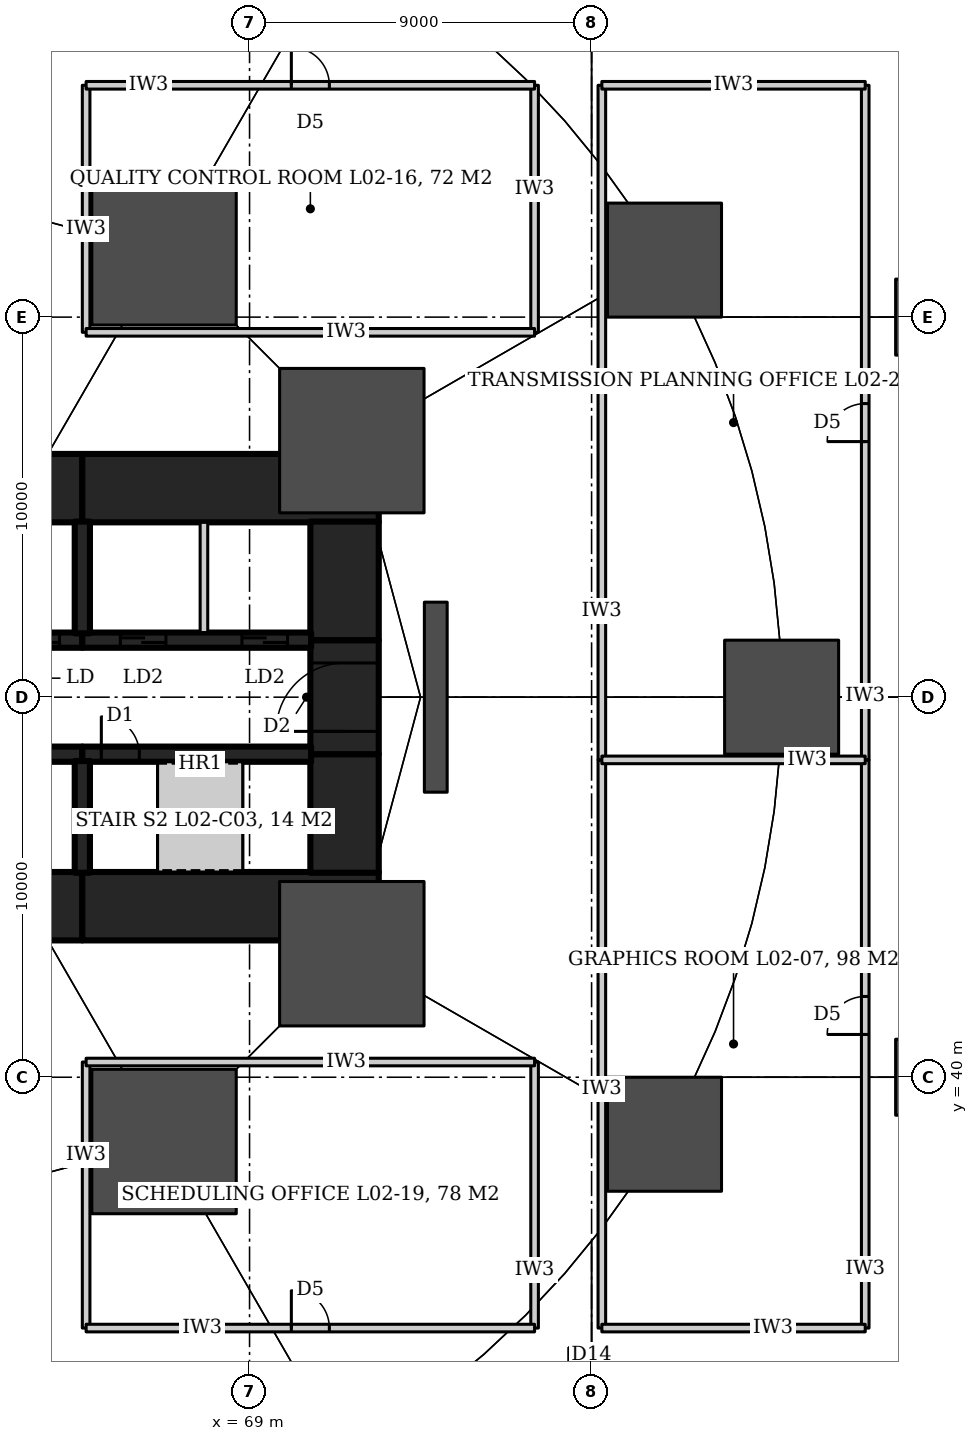
"""IFC4 building model, lengths in metres.
Left out: names, types, materials, properties, quantities, classifications, styles, units other than length and angle.
Written with IfcOpenShell. Run it as: python <this file> out.ifc"""

import sys

from ifc_helpers import new_model, si_unit, direction, frame, frame_2d, origin, origin_2d, place, context, subcontext, project, spatial, rectangle, circle, extrude, element, fill, save


model = new_model("IFC4")
c1 = context("Model", 3, precision=1e-05, world=origin(), true_north=direction((0.0, 1.0)))
c2 = subcontext(c1, "Body", "Model", "MODEL_VIEW")
j1 = project(units=[si_unit("LENGTHUNIT", "METRE"), si_unit("PLANEANGLEUNIT", "RADIAN")], contexts=[c1])
p1 = place(None, origin())
s1 = spatial("IfcSite", under=j1, at=p1, CompositionType="ELEMENT")
p2 = place(p1, origin())
s2 = spatial("IfcBuilding", under=s1, at=p2, CompositionType="ELEMENT")
p3 = place(p2, frame((0.0, 0.0, 15.0)))
s3 = spatial("IfcBuildingStorey", under=s2, at=p3, CompositionType="ELEMENT", Elevation=15.0)
for number, where, z_axis, x_axis in (
    (1, (87.0, 40.0, 0.0), (0.0, 0.0, 1.0), (1.0, 0.0, 0.0)),
    (2, (87.0, 60.0, 0.0), (0.0, 0.0, 1.0), (1.0, 0.0, 0.0)),
):
    element("IfcColumn", number, at=place(p3, frame(where, z_axis=z_axis, x_axis=x_axis)), inside=s3, PredefinedType="COLUMN", context=c2, shape_type="SweptSolid", body=[
        extrude(rectangle(XDim=2.0, YDim=2.0, at=origin_2d()), origin(), (0.0, 0.0, 1.0), 5.0),
    ])
for number, where, z_axis, x_axis in (
    (3, (83.0, 50.0, 0.0), (0.0, 0.0, 1.0), (1.0, 0.0, 0.0)),
    (4, (79.919, 61.5, 0.0), (0.0, 0.0, 1.0), (1.0, 0.0, 0.0)),
    (5, (79.919, 38.5, 0.0), (0.0, 0.0, 1.0), (1.0, 0.0, 0.0)),
):
    element("IfcColumn", number, at=place(p3, frame(where, z_axis=z_axis, x_axis=x_axis)), inside=s3, PredefinedType="COLUMN", context=c2, shape_type="SweptSolid", body=[
        extrude(circle(Radius=1.5, at=origin_2d()), origin(), (0.0, 0.0, 1.0), 5.0),
    ])
p4 = place(p3, frame((73.9, 50.0, 0.0), z_axis=(0.0, 0.0, 1.0), x_axis=(1.0, 0.0, 0.0)))
e6 = element("IfcColumn", 6, at=p4, inside=s3, PredefinedType="COLUMN", context=c2, shape_type="SweptSolid", body=[
    extrude(rectangle(XDim=0.6, YDim=5.0, at=origin_2d()), origin(), (0.0, 0.0, 1.0), 5.0),
])
for number, where, z_axis, x_axis in (
    (7, (71.691, 56.75, 0.0), (0.0, 0.0, 1.0), (1.0, 0.0, 0.0)),
    (8, (66.75, 61.691, 0.0), (0.0, 0.0, 1.0), (1.0, 0.0, 0.0)),
    (9, (66.75, 38.309, 0.0), (0.0, 0.0, 1.0), (1.0, 0.0, 0.0)),
    (10, (71.691, 43.25, 0.0), (0.0, 0.0, 1.0), (1.0, 0.0, 0.0)),
):
    element("IfcColumn", number, at=place(p3, frame(where, z_axis=z_axis, x_axis=x_axis)), inside=s3, PredefinedType="COLUMN", context=c2, shape_type="SweptSolid", body=[
        extrude(circle(Radius=1.9, at=origin_2d()), origin(), (0.0, 0.0, 1.0), 5.0),
    ])
p5 = place(p3, frame((55.4, 55.5, 0.0), z_axis=(0.0, 0.0, 1.0), x_axis=(1.0, 0.0, 0.0)))
e11 = element("IfcWall", 11, at=p5, inside=s3, PredefinedType="SHEAR", context=c2, shape_type="SweptSolid", body=[
    extrude(rectangle(XDim=9.2, YDim=1.8, at=frame_2d((4.6, 0.0))), origin(), (0.0, 0.0, 1.0), 5.0),
])
p6 = place(p3, frame((64.6, 55.5, 0.0), z_axis=(0.0, 0.0, 1.0), x_axis=(1.0, 0.0, 0.0)))
e12 = element("IfcWall", 12, at=p6, inside=s3, PredefinedType="SHEAR", context=c2, shape_type="SweptSolid", body=[
    extrude(rectangle(XDim=7.8, YDim=1.8, at=frame_2d((3.9, 0.0))), origin(), (0.0, 0.0, 1.0), 5.0),
])
p7 = place(p3, frame((55.4, 44.5, 0.0), z_axis=(0.0, 0.0, 1.0), x_axis=(1.0, 0.0, 0.0)))
e13 = element("IfcWall", 13, at=p7, inside=s3, PredefinedType="SHEAR", context=c2, shape_type="SweptSolid", body=[
    extrude(rectangle(XDim=9.2, YDim=1.8, at=frame_2d((4.6, 0.0))), origin(), (0.0, 0.0, 1.0), 5.0),
])
p8 = place(p3, frame((64.6, 44.5, 0.0), z_axis=(0.0, 0.0, 1.0), x_axis=(1.0, 0.0, 0.0)))
e14 = element("IfcWall", 14, at=p8, inside=s3, PredefinedType="SHEAR", context=c2, shape_type="SweptSolid", body=[
    extrude(rectangle(XDim=7.8, YDim=1.8, at=frame_2d((3.9, 0.0))), origin(), (0.0, 0.0, 1.0), 5.0),
])
p9 = place(p3, frame((71.5, 45.38, 0.0), z_axis=(0.0, 0.0, 1.0), x_axis=(0.0, 1.0, 0.0)))
e15 = element("IfcWall", 15, at=p9, inside=s3, PredefinedType="SHEAR", context=c2, shape_type="SweptSolid", body=[
    extrude(rectangle(XDim=3.12, YDim=1.8, at=frame_2d((1.56, 0.0))), origin(), (0.0, 0.0, 1.0), 5.0),
])
p10 = place(p3, frame((71.5, 48.5, 0.0), z_axis=(0.0, 0.0, 1.0), x_axis=(0.0, 1.0, 0.0)))
e16 = element("IfcWall", 16, at=p10, inside=s3, PredefinedType="SHEAR", context=c2, shape_type="SweptSolid", body=[
    extrude(rectangle(XDim=3.0, YDim=1.8, at=frame_2d((1.5, 0.0))), origin(), (0.0, 0.0, 1.0), 5.0),
])
p11 = place(p10, frame((0.6, 0.0, 0.0)))
e17 = element("IfcOpeningElement", 17, at=p11, cuts=e16, PredefinedType="OPENING", context=c2, shape_type="SweptSolid", body=[
    extrude(rectangle(XDim=1.8, YDim=2.1, at=frame_2d((0.9, 1.05))), frame((0.0, 0.91, 0.0), z_axis=(0.0, -1.0, 0.0), x_axis=(1.0, 0.0, 0.0)), (0.0, 0.0, 1.0), 1.82),
])
p12 = place(p3, frame((71.5, 51.5, 0.0), z_axis=(0.0, 0.0, 1.0), x_axis=(0.0, 1.0, 0.0)))
e18 = element("IfcWall", 18, at=p12, inside=s3, PredefinedType="SHEAR", context=c2, shape_type="SweptSolid", body=[
    extrude(rectangle(XDim=3.12, YDim=1.8, at=frame_2d((1.56, 0.0))), origin(), (0.0, 0.0, 1.0), 5.0),
])
p13 = place(p3, frame((55.4, 51.5, 0.0), z_axis=(0.0, 0.0, 1.0), x_axis=(1.0, 0.0, 0.0)))
e19 = element("IfcWall", 19, at=p13, inside=s3, PredefinedType="SHEAR", context=c2, shape_type="SweptSolid", body=[
    extrude(rectangle(XDim=9.2, YDim=0.4, at=frame_2d((4.6, 0.0))), origin(), (0.0, 0.0, 1.0), 5.0),
])
p14 = place(p13, frame((0.6, 0.0, 0.0)))
e20 = element("IfcOpeningElement", 20, at=p14, cuts=e19, PredefinedType="OPENING", context=c2, shape_type="SweptSolid", body=[
    extrude(rectangle(XDim=1.1, YDim=2.1, at=frame_2d((0.55, 1.05))), frame((0.0, 0.21, 0.0), z_axis=(0.0, -1.0, 0.0), x_axis=(1.0, 0.0, 0.0)), (0.0, 0.0, 1.0), 0.42),
])
p15 = place(p13, frame((2.9, 0.0, 0.0)))
e21 = element("IfcOpeningElement", 21, at=p15, cuts=e19, PredefinedType="OPENING", context=c2, shape_type="SweptSolid", body=[
    extrude(rectangle(XDim=1.1, YDim=2.1, at=frame_2d((0.55, 1.05))), frame((0.0, 0.21, 0.0), z_axis=(0.0, -1.0, 0.0), x_axis=(1.0, 0.0, 0.0)), (0.0, 0.0, 1.0), 0.42),
])
p16 = place(p13, frame((5.2, 0.0, 0.0)))
e22 = element("IfcOpeningElement", 22, at=p16, cuts=e19, PredefinedType="OPENING", context=c2, shape_type="SweptSolid", body=[
    extrude(rectangle(XDim=1.1, YDim=2.1, at=frame_2d((0.55, 1.05))), frame((0.0, 0.21, 0.0), z_axis=(0.0, -1.0, 0.0), x_axis=(1.0, 0.0, 0.0)), (0.0, 0.0, 1.0), 0.42),
])
p17 = place(p13, frame((7.5, 0.0, 0.0)))
e23 = element("IfcOpeningElement", 23, at=p17, cuts=e19, PredefinedType="OPENING", context=c2, shape_type="SweptSolid", body=[
    extrude(rectangle(XDim=1.1, YDim=2.1, at=frame_2d((0.55, 1.05))), frame((0.0, 0.21, 0.0), z_axis=(0.0, -1.0, 0.0), x_axis=(1.0, 0.0, 0.0)), (0.0, 0.0, 1.0), 0.42),
])
p18 = place(p3, frame((64.6, 51.5, 0.0), z_axis=(0.0, 0.0, 1.0), x_axis=(1.0, 0.0, 0.0)))
e24 = element("IfcWall", 24, at=p18, inside=s3, PredefinedType="SHEAR", context=c2, shape_type="SweptSolid", body=[
    extrude(rectangle(XDim=6.02, YDim=0.4, at=frame_2d((3.01, 0.0))), origin(), (0.0, 0.0, 1.0), 5.0),
])
p19 = place(p18, frame((1.0, 0.0, 0.0)))
e25 = element("IfcOpeningElement", 25, at=p19, cuts=e24, PredefinedType="OPENING", context=c2, shape_type="SweptSolid", body=[
    extrude(rectangle(XDim=1.2, YDim=2.1, at=frame_2d((0.6, 1.05))), frame((0.0, 0.21, 0.0), z_axis=(0.0, -1.0, 0.0), x_axis=(1.0, 0.0, 0.0)), (0.0, 0.0, 1.0), 0.42),
])
p20 = place(p18, frame((4.2, 0.0, 0.0)))
e26 = element("IfcOpeningElement", 26, at=p20, cuts=e24, PredefinedType="OPENING", context=c2, shape_type="SweptSolid", body=[
    extrude(rectangle(XDim=1.2, YDim=2.1, at=frame_2d((0.6, 1.05))), frame((0.0, 0.21, 0.0), z_axis=(0.0, -1.0, 0.0), x_axis=(1.0, 0.0, 0.0)), (0.0, 0.0, 1.0), 0.42),
])
p21 = place(p3, frame((55.4, 48.5, 0.0), z_axis=(0.0, 0.0, 1.0), x_axis=(1.0, 0.0, 0.0)))
e27 = element("IfcWall", 27, at=p21, inside=s3, PredefinedType="SHEAR", context=c2, shape_type="SweptSolid", body=[
    extrude(rectangle(XDim=9.2, YDim=0.4, at=frame_2d((4.6, 0.0))), origin(), (0.0, 0.0, 1.0), 5.0),
])
p22 = place(p3, frame((64.6, 48.5, 0.0), z_axis=(0.0, 0.0, 1.0), x_axis=(1.0, 0.0, 0.0)))
e28 = element("IfcWall", 28, at=p22, inside=s3, PredefinedType="SHEAR", context=c2, shape_type="SweptSolid", body=[
    extrude(rectangle(XDim=6.02, YDim=0.4, at=frame_2d((3.01, 0.0))), origin(), (0.0, 0.0, 1.0), 5.0),
])
p23 = place(p22, frame((0.5, 0.0, 0.0)))
e29 = element("IfcOpeningElement", 29, at=p23, cuts=e28, PredefinedType="OPENING", context=c2, shape_type="SweptSolid", body=[
    extrude(rectangle(XDim=1.0, YDim=2.1, at=frame_2d((0.5, 1.05))), frame((0.0, 0.21, 0.0), z_axis=(0.0, -1.0, 0.0), x_axis=(1.0, 0.0, 0.0)), (0.0, 0.0, 1.0), 0.42),
])
for number, where, z_axis, x_axis in (
    (30, (64.6, 51.68, 0.0), (0.0, 0.0, 1.0), (0.0, 1.0, 0.0)),
    (31, (64.6, 48.32, 0.0), (0.0, 0.0, 1.0), (0.0, -1.0, 0.0)),
):
    element("IfcWall", number, at=place(p3, frame(where, z_axis=z_axis, x_axis=x_axis)), inside=s3, PredefinedType="SHEAR", context=c2, shape_type="SweptSolid", body=[
        extrude(rectangle(XDim=2.94, YDim=0.4, at=frame_2d((1.47, 0.0))), origin(), (0.0, 0.0, 1.0), 5.0),
    ])
p24 = place(p3, frame((64.7, 33.4, 0.0), z_axis=(0.0, 0.0, 1.0), x_axis=(0.0, 1.0, 0.0)))
e32 = element("IfcWall", 32, at=p24, inside=s3, PredefinedType="PARTITIONING", context=c2, shape_type="SweptSolid", body=[
    extrude(rectangle(XDim=7.0, YDim=0.2, at=frame_2d((3.5, 0.0))), origin(), (0.0, 0.0, 1.0), 1.48),
])
p25 = place(p3, frame((64.7, 59.6, 0.0), z_axis=(0.0, 0.0, 1.0), x_axis=(0.0, 1.0, 0.0)))
e33 = element("IfcWall", 33, at=p25, inside=s3, PredefinedType="PARTITIONING", context=c2, shape_type="SweptSolid", body=[
    extrude(rectangle(XDim=6.5, YDim=0.2, at=frame_2d((3.25, 0.0))), origin(), (0.0, 0.0, 1.0), 1.48),
])
p26 = place(p3, frame((76.5, 33.4, 0.0), z_axis=(0.0, 0.0, 1.0), x_axis=(0.0, 1.0, 0.0)))
e34 = element("IfcWall", 34, at=p26, inside=s3, PredefinedType="PARTITIONING", context=c2, shape_type="SweptSolid", body=[
    extrude(rectangle(XDim=7.0, YDim=0.2, at=frame_2d((3.5, 0.0))), origin(), (0.0, 0.0, 1.0), 2.08),
])
p27 = place(p3, frame((76.5, 59.6, 0.0), z_axis=(0.0, 0.0, 1.0), x_axis=(0.0, 1.0, 0.0)))
e35 = element("IfcWall", 35, at=p27, inside=s3, PredefinedType="PARTITIONING", context=c2, shape_type="SweptSolid", body=[
    extrude(rectangle(XDim=6.5, YDim=0.2, at=frame_2d((3.25, 0.0))), origin(), (0.0, 0.0, 1.0), 2.08),
])
p28 = place(p3, frame((78.27, 33.4, 0.0), z_axis=(0.0, 0.0, 1.0), x_axis=(0.0, 1.0, 0.0)))
e36 = element("IfcWall", 36, at=p28, inside=s3, PredefinedType="PARTITIONING", context=c2, shape_type="SweptSolid", body=[
    extrude(rectangle(XDim=14.95, YDim=0.2, at=frame_2d((7.475, 0.0))), origin(), (0.0, 0.0, 1.0), 2.08),
])
p29 = place(p3, frame((78.27, 48.35, 0.0), z_axis=(0.0, 0.0, 1.0), x_axis=(0.0, 1.0, 0.0)))
e37 = element("IfcWall", 37, at=p29, inside=s3, PredefinedType="PARTITIONING", context=c2, shape_type="SweptSolid", body=[
    extrude(rectangle(XDim=17.75, YDim=0.2, at=frame_2d((8.875, 0.0))), origin(), (0.0, 0.0, 1.0), 2.08),
])
p30 = place(p3, frame((85.2, 33.4, 0.0), z_axis=(0.0, 0.0, 1.0), x_axis=(0.0, 1.0, 0.0)))
e38 = element("IfcWall", 38, at=p30, inside=s3, PredefinedType="PARTITIONING", context=c2, shape_type="SweptSolid", body=[
    extrude(rectangle(XDim=14.95, YDim=0.2, at=frame_2d((7.475, 0.0))), origin(), (0.0, 0.0, 1.0), 2.68),
])
p31 = place(p30, frame((7.725, 0.0, 0.0)))
e39 = element("IfcOpeningElement", 39, at=p31, cuts=e38, PredefinedType="OPENING", context=c2, shape_type="SweptSolid", body=[
    extrude(rectangle(XDim=1.0, YDim=2.1, at=frame_2d((0.5, 1.05))), frame((0.0, 0.11, 0.0), z_axis=(0.0, -1.0, 0.0), x_axis=(1.0, 0.0, 0.0)), (0.0, 0.0, 1.0), 0.22),
])
p32 = place(p3, frame((85.2, 48.35, 0.0), z_axis=(0.0, 0.0, 1.0), x_axis=(0.0, 1.0, 0.0)))
e40 = element("IfcWall", 40, at=p32, inside=s3, PredefinedType="PARTITIONING", context=c2, shape_type="SweptSolid", body=[
    extrude(rectangle(XDim=17.75, YDim=0.2, at=frame_2d((8.875, 0.0))), origin(), (0.0, 0.0, 1.0), 2.18),
])
p33 = place(p32, frame((8.375, 0.0, 0.0)))
e41 = element("IfcOpeningElement", 41, at=p33, cuts=e40, PredefinedType="OPENING", context=c2, shape_type="SweptSolid", body=[
    extrude(rectangle(XDim=1.0, YDim=2.1, at=frame_2d((0.5, 1.05))), frame((0.0, 0.11, 0.0), z_axis=(0.0, -1.0, 0.0), x_axis=(1.0, 0.0, 0.0)), (0.0, 0.0, 1.0), 0.22),
])
p34 = place(p3, frame((64.7, 33.4, 0.0), z_axis=(0.0, 0.0, 1.0), x_axis=(1.0, 0.0, 0.0)))
e42 = element("IfcWall", 42, at=p34, inside=s3, PredefinedType="PARTITIONING", context=c2, shape_type="SweptSolid", body=[
    extrude(rectangle(XDim=11.8, YDim=0.2, at=frame_2d((5.9, 0.0))), origin(), (0.0, 0.0, 1.0), 2.08),
])
p35 = place(p34, frame((5.4, 0.0, 0.0)))
e43 = element("IfcOpeningElement", 43, at=p35, cuts=e42, PredefinedType="OPENING", context=c2, shape_type="SweptSolid", body=[
    extrude(rectangle(XDim=1.0, YDim=2.1, at=frame_2d((0.5, 1.05))), frame((0.0, 0.11, 0.0), z_axis=(0.0, -1.0, 0.0), x_axis=(1.0, 0.0, 0.0)), (0.0, 0.0, 1.0), 0.22),
])
p36 = place(p3, frame((78.27, 33.4, 0.0), z_axis=(0.0, 0.0, 1.0), x_axis=(1.0, 0.0, 0.0)))
e44 = element("IfcWall", 44, at=p36, inside=s3, PredefinedType="PARTITIONING", context=c2, shape_type="SweptSolid", body=[
    extrude(rectangle(XDim=6.93, YDim=0.2, at=frame_2d((3.465, 0.0))), origin(), (0.0, 0.0, 1.0), 2.68),
])
p37 = place(p3, frame((64.7, 40.4, 0.0), z_axis=(0.0, 0.0, 1.0), x_axis=(1.0, 0.0, 0.0)))
e45 = element("IfcWall", 45, at=p37, inside=s3, PredefinedType="PARTITIONING", context=c2, shape_type="SweptSolid", body=[
    extrude(rectangle(XDim=11.8, YDim=0.2, at=frame_2d((5.9, 0.0))), origin(), (0.0, 0.0, 1.0), 1.48),
])
p38 = place(p3, frame((78.27, 48.35, 0.0), z_axis=(0.0, 0.0, 1.0), x_axis=(1.0, 0.0, 0.0)))
e46 = element("IfcWall", 46, at=p38, inside=s3, PredefinedType="PARTITIONING", context=c2, shape_type="SweptSolid", body=[
    extrude(rectangle(XDim=6.93, YDim=0.2, at=frame_2d((3.465, 0.0))), origin(), (0.0, 0.0, 1.0), 2.68),
])
p39 = place(p3, frame((64.7, 59.6, 0.0), z_axis=(0.0, 0.0, 1.0), x_axis=(1.0, 0.0, 0.0)))
e47 = element("IfcWall", 47, at=p39, inside=s3, PredefinedType="PARTITIONING", context=c2, shape_type="SweptSolid", body=[
    extrude(rectangle(XDim=11.8, YDim=0.2, at=frame_2d((5.9, 0.0))), origin(), (0.0, 0.0, 1.0), 1.48),
])
p40 = place(p3, frame((64.7, 66.1, 0.0), z_axis=(0.0, 0.0, 1.0), x_axis=(1.0, 0.0, 0.0)))
e48 = element("IfcWall", 48, at=p40, inside=s3, PredefinedType="PARTITIONING", context=c2, shape_type="SweptSolid", body=[
    extrude(rectangle(XDim=11.8, YDim=0.2, at=frame_2d((5.9, 0.0))), origin(), (0.0, 0.0, 1.0), 2.08),
])
p41 = place(p40, frame((5.4, 0.0, 0.0)))
e49 = element("IfcOpeningElement", 49, at=p41, cuts=e48, PredefinedType="OPENING", context=c2, shape_type="SweptSolid", body=[
    extrude(rectangle(XDim=1.0, YDim=2.1, at=frame_2d((0.5, 1.05))), frame((0.0, 0.11, 0.0), z_axis=(0.0, -1.0, 0.0), x_axis=(1.0, 0.0, 0.0)), (0.0, 0.0, 1.0), 0.22),
])
p42 = place(p3, frame((78.27, 66.1, 0.0), z_axis=(0.0, 0.0, 1.0), x_axis=(1.0, 0.0, 0.0)))
e50 = element("IfcWall", 50, at=p42, inside=s3, PredefinedType="PARTITIONING", context=c2, shape_type="SweptSolid", body=[
    extrude(rectangle(XDim=6.93, YDim=0.2, at=frame_2d((3.465, 0.0))), origin(), (0.0, 0.0, 1.0), 2.68),
])
p43 = place(p3, frame((67.8, 51.7, 0.0), z_axis=(0.0, 0.0, 1.0), x_axis=(0.0, 1.0, 0.0)))
e51 = element("IfcWall", 51, at=p43, inside=s3, PredefinedType="PARTITIONING", context=c2, shape_type="SweptSolid", body=[
    extrude(rectangle(XDim=2.9, YDim=0.2, at=frame_2d((1.45, 0.0))), origin(), (0.0, 0.0, 1.0), 5.0),
])
p44 = place(p31, origin())
e52 = element("IfcDoor", 52, at=p44, inside=s3, OperationType="SINGLE_SWING_LEFT", PredefinedType="DOOR", context=c2, shape_type="SweptSolid", body=[
    extrude(rectangle(XDim=1.0, YDim=2.1, at=frame_2d((0.5, 1.05))), frame((0.0, 0.025, 0.0), z_axis=(0.0, -1.0, 0.0), x_axis=(1.0, 0.0, 0.0)), (0.0, 0.0, 1.0), 0.05),
])
fill(e39, e52)
p45 = place(p33, origin())
e53 = element("IfcDoor", 53, at=p45, inside=s3, OperationType="SINGLE_SWING_LEFT", PredefinedType="DOOR", context=c2, shape_type="SweptSolid", body=[
    extrude(rectangle(XDim=1.0, YDim=2.1, at=frame_2d((0.5, 1.05))), frame((0.0, 0.025, 0.0), z_axis=(0.0, -1.0, 0.0), x_axis=(1.0, 0.0, 0.0)), (0.0, 0.0, 1.0), 0.05),
])
fill(e41, e53)
p46 = place(p35, origin())
e54 = element("IfcDoor", 54, at=p46, inside=s3, OperationType="SINGLE_SWING_LEFT", PredefinedType="DOOR", context=c2, shape_type="SweptSolid", body=[
    extrude(rectangle(XDim=1.0, YDim=2.1, at=frame_2d((0.5, 1.05))), frame((0.0, 0.025, 0.0), z_axis=(0.0, -1.0, 0.0), x_axis=(1.0, 0.0, 0.0)), (0.0, 0.0, 1.0), 0.05),
])
fill(e43, e54)
p47 = place(p41, origin())
e55 = element("IfcDoor", 55, at=p47, inside=s3, OperationType="SINGLE_SWING_LEFT", PredefinedType="DOOR", context=c2, shape_type="SweptSolid", body=[
    extrude(rectangle(XDim=1.0, YDim=2.1, at=frame_2d((0.5, 1.05))), frame((0.0, 0.025, 0.0), z_axis=(0.0, -1.0, 0.0), x_axis=(1.0, 0.0, 0.0)), (0.0, 0.0, 1.0), 0.05),
])
fill(e49, e55)
p48 = place(p23, origin())
e56 = element("IfcDoor", 56, at=p48, inside=s3, OperationType="SINGLE_SWING_LEFT", PredefinedType="DOOR", context=c2, shape_type="SweptSolid", body=[
    extrude(rectangle(XDim=1.0, YDim=2.1, at=frame_2d((0.5, 1.05))), frame((0.0, 0.025, 0.0), z_axis=(0.0, -1.0, 0.0), x_axis=(1.0, 0.0, 0.0)), (0.0, 0.0, 1.0), 0.05),
])
fill(e29, e56)
p49 = place(p19, origin())
e57 = element("IfcDoor", 57, at=p49, inside=s3, OperationType="SLIDING_TO_LEFT", PredefinedType="DOOR", context=c2, shape_type="SweptSolid", body=[
    extrude(rectangle(XDim=1.2, YDim=2.1, at=frame_2d((0.6, 1.05))), frame((0.0, 0.025, 0.0), z_axis=(0.0, -1.0, 0.0), x_axis=(1.0, 0.0, 0.0)), (0.0, 0.0, 1.0), 0.05),
])
fill(e25, e57)
p50 = place(p20, origin())
e58 = element("IfcDoor", 58, at=p50, inside=s3, OperationType="SLIDING_TO_LEFT", PredefinedType="DOOR", context=c2, shape_type="SweptSolid", body=[
    extrude(rectangle(XDim=1.2, YDim=2.1, at=frame_2d((0.6, 1.05))), frame((0.0, 0.025, 0.0), z_axis=(0.0, -1.0, 0.0), x_axis=(1.0, 0.0, 0.0)), (0.0, 0.0, 1.0), 0.05),
])
fill(e26, e58)
p51 = place(p17, origin())
e59 = element("IfcDoor", 59, at=p51, inside=s3, OperationType="SLIDING_TO_LEFT", PredefinedType="DOOR", context=c2, shape_type="SweptSolid", body=[
    extrude(rectangle(XDim=1.1, YDim=2.1, at=frame_2d((0.55, 1.05))), frame((0.0, 0.025, 0.0), z_axis=(0.0, -1.0, 0.0), x_axis=(1.0, 0.0, 0.0)), (0.0, 0.0, 1.0), 0.05),
])
fill(e23, e59)
p52 = place(p11, origin())
e60 = element("IfcDoor", 60, at=p52, inside=s3, OperationType="DOUBLE_DOOR_DOUBLE_SWING", PredefinedType="DOOR", context=c2, shape_type="SweptSolid", body=[
    extrude(rectangle(XDim=1.8, YDim=2.1, at=frame_2d((0.9, 1.05))), frame((0.0, 0.025, 0.0), z_axis=(0.0, -1.0, 0.0), x_axis=(1.0, 0.0, 0.0)), (0.0, 0.0, 1.0), 0.05),
])
fill(e17, e60)
save(model, sys.argv[1])
